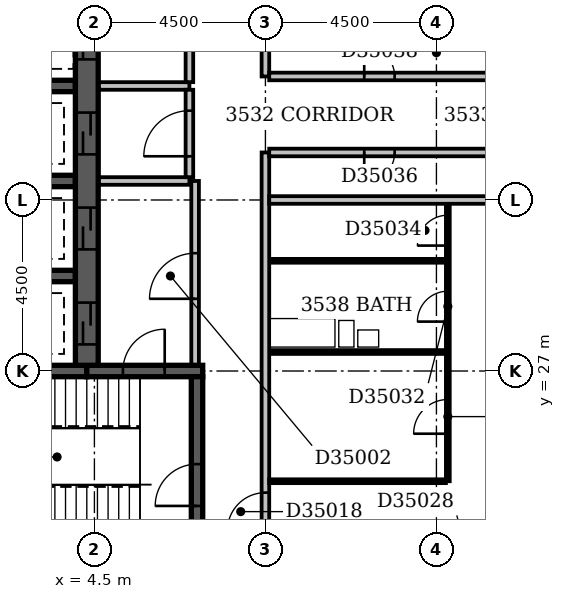
"""IFC4 building model, lengths in metres.
Left out: names, types, materials, properties, quantities, classifications, styles, units other than length and angle.
Written with IfcOpenShell. Run it as: python <this file> out.ifc"""

import sys

from ifc_helpers import new_model, si_unit, direction, frame, frame_2d, origin, place, context, subcontext, project, spatial, rectangle, extrude, element, fill, save


model = new_model("IFC4")
c1 = context("Model", 3, precision=1e-05, world=origin(), true_north=direction((0.0, 1.0)))
c2 = subcontext(c1, "Body", "Model", "MODEL_VIEW")
j1 = project(units=[si_unit("LENGTHUNIT", "METRE"), si_unit("PLANEANGLEUNIT", "RADIAN")], contexts=[c1])
p1 = place(None, origin())
s1 = spatial("IfcSite", under=j1, at=p1, CompositionType="ELEMENT")
p2 = place(p1, origin())
s2 = spatial("IfcBuilding", under=s1, at=p2, CompositionType="ELEMENT")
p3 = place(p2, frame((0.0, 0.0, 141.2)))
s3 = spatial("IfcBuildingStorey", under=s2, at=p3, CompositionType="ELEMENT", Elevation=141.2)
p4 = place(p3, frame((0.35, 27.0, -0.3), z_axis=(0.0, 0.0, 1.0), x_axis=(1.0, 0.0, 0.0)))
e1 = element("IfcWall", 1, at=p4, inside=s3, PredefinedType="SHEAR", context=c2, shape_type="SweptSolid", body=[
    extrude(rectangle(XDim=3.95, YDim=0.3, at=frame_2d((1.975, 0.0))), origin(), (0.0, 0.0, 1.0), 3.6),
])
for number, where, z_axis, x_axis in (
    (2, (0.8, 29.5, -0.3), (0.0, 0.0, 1.0), (1.0, 0.0, 0.0)),
    (3, (0.8, 32.0, -0.3), (0.0, 0.0, 1.0), (1.0, 0.0, 0.0)),
    (4, (0.8, 34.5, -0.3), (0.0, 0.0, 1.0), (1.0, 0.0, 0.0)),
):
    element("IfcWall", number, at=place(p3, frame(where, z_axis=z_axis, x_axis=x_axis)), inside=s3, PredefinedType="SHEAR", context=c2, shape_type="SweptSolid", body=[
        extrude(rectangle(XDim=3.2, YDim=0.3, at=frame_2d((1.6, 0.0))), origin(), (0.0, 0.0, 1.0), 3.6),
    ])
p5 = place(p3, frame((4.3, 27.0, -0.3), z_axis=(0.0, 0.0, 1.0), x_axis=(1.0, 0.0, 0.0)))
e5 = element("IfcWall", 5, at=p5, inside=s3, PredefinedType="SHEAR", context=c2, shape_type="SweptSolid", body=[
    extrude(rectangle(XDim=3.05, YDim=0.3, at=frame_2d((1.525, 0.0))), origin(), (0.0, 0.0, 1.0), 3.6),
])
p6 = place(p5, frame((0.95, 0.0, 0.3)))
e6 = element("IfcOpeningElement", 6, at=p6, cuts=e5, PredefinedType="OPENING", context=c2, shape_type="SweptSolid", body=[
    extrude(rectangle(XDim=1.1, YDim=2.1, at=frame_2d((0.55, 1.05))), frame((0.0, 0.162, 0.0), z_axis=(0.0, -1.0, 0.0), x_axis=(1.0, 0.0, 0.0)), (0.0, 0.0, 1.0), 0.324),
])
p7 = place(p3, frame((4.3, 27.15, -0.3), z_axis=(0.0, 0.0, 1.0), x_axis=(0.0, 1.0, 0.0)))
e7 = element("IfcWall", 7, at=p7, inside=s3, PredefinedType="SHEAR", context=c2, shape_type="SweptSolid", body=[
    extrude(rectangle(XDim=22.05, YDim=0.6, at=frame_2d((11.025, 0.0))), origin(), (0.0, 0.0, 1.0), 3.6),
])
p8 = place(p7, frame((3.05, 0.0, 0.3)))
e8 = element("IfcOpeningElement", 8, at=p8, cuts=e7, PredefinedType="OPENING", context=c2, shape_type="SweptSolid", body=[
    extrude(rectangle(XDim=1.1, YDim=2.1, at=frame_2d((0.55, 1.05))), frame((0.0, 0.312, 0.0), z_axis=(0.0, -1.0, 0.0), x_axis=(1.0, 0.0, 0.0)), (0.0, 0.0, 1.0), 0.624),
])
p9 = place(p7, frame((0.55, 0.0, 0.3)))
e9 = element("IfcOpeningElement", 9, at=p9, cuts=e7, PredefinedType="OPENING", context=c2, shape_type="SweptSolid", body=[
    extrude(rectangle(XDim=1.1, YDim=2.1, at=frame_2d((0.55, 1.05))), frame((0.0, 0.312, 0.0), z_axis=(0.0, -1.0, 0.0), x_axis=(1.0, 0.0, 0.0)), (0.0, 0.0, 1.0), 0.624),
])
p10 = place(p7, frame((20.55, 0.0, 0.3)))
e10 = element("IfcOpeningElement", 10, at=p10, cuts=e7, PredefinedType="OPENING", context=c2, shape_type="SweptSolid", body=[
    extrude(rectangle(XDim=1.1, YDim=2.1, at=frame_2d((0.55, 1.05))), frame((0.0, 0.312, 0.0), z_axis=(0.0, -1.0, 0.0), x_axis=(1.0, 0.0, 0.0)), (0.0, 0.0, 1.0), 0.624),
])
p11 = place(p7, frame((18.05, 0.0, 0.3)))
e11 = element("IfcOpeningElement", 11, at=p11, cuts=e7, PredefinedType="OPENING", context=c2, shape_type="SweptSolid", body=[
    extrude(rectangle(XDim=1.1, YDim=2.1, at=frame_2d((0.55, 1.05))), frame((0.0, 0.312, 0.0), z_axis=(0.0, -1.0, 0.0), x_axis=(1.0, 0.0, 0.0)), (0.0, 0.0, 1.0), 0.624),
])
p12 = place(p7, frame((15.55, 0.0, 0.3)))
e12 = element("IfcOpeningElement", 12, at=p12, cuts=e7, PredefinedType="OPENING", context=c2, shape_type="SweptSolid", body=[
    extrude(rectangle(XDim=1.1, YDim=2.1, at=frame_2d((0.55, 1.05))), frame((0.0, 0.312, 0.0), z_axis=(0.0, -1.0, 0.0), x_axis=(1.0, 0.0, 0.0)), (0.0, 0.0, 1.0), 0.624),
])
p13 = place(p7, frame((13.05, 0.0, 0.3)))
e13 = element("IfcOpeningElement", 13, at=p13, cuts=e7, PredefinedType="OPENING", context=c2, shape_type="SweptSolid", body=[
    extrude(rectangle(XDim=1.1, YDim=2.1, at=frame_2d((0.55, 1.05))), frame((0.0, 0.312, 0.0), z_axis=(0.0, -1.0, 0.0), x_axis=(1.0, 0.0, 0.0)), (0.0, 0.0, 1.0), 0.624),
])
p14 = place(p7, frame((10.55, 0.0, 0.3)))
e14 = element("IfcOpeningElement", 14, at=p14, cuts=e7, PredefinedType="OPENING", context=c2, shape_type="SweptSolid", body=[
    extrude(rectangle(XDim=1.1, YDim=2.1, at=frame_2d((0.55, 1.05))), frame((0.0, 0.312, 0.0), z_axis=(0.0, -1.0, 0.0), x_axis=(1.0, 0.0, 0.0)), (0.0, 0.0, 1.0), 0.624),
])
p15 = place(p7, frame((8.05, 0.0, 0.3)))
e15 = element("IfcOpeningElement", 15, at=p15, cuts=e7, PredefinedType="OPENING", context=c2, shape_type="SweptSolid", body=[
    extrude(rectangle(XDim=1.1, YDim=2.1, at=frame_2d((0.55, 1.05))), frame((0.0, 0.312, 0.0), z_axis=(0.0, -1.0, 0.0), x_axis=(1.0, 0.0, 0.0)), (0.0, 0.0, 1.0), 0.624),
])
p16 = place(p7, frame((5.55, 0.0, 0.3)))
e16 = element("IfcOpeningElement", 16, at=p16, cuts=e7, PredefinedType="OPENING", context=c2, shape_type="SweptSolid", body=[
    extrude(rectangle(XDim=1.1, YDim=2.1, at=frame_2d((0.55, 1.05))), frame((0.0, 0.312, 0.0), z_axis=(0.0, -1.0, 0.0), x_axis=(1.0, 0.0, 0.0)), (0.0, 0.0, 1.0), 0.624),
])
p17 = place(p3, frame((7.2, 22.65, -0.3), z_axis=(0.0, 0.0, 1.0), x_axis=(0.0, 1.0, 0.0)))
e17 = element("IfcWall", 17, at=p17, inside=s3, PredefinedType="SHEAR", context=c2, shape_type="SweptSolid", body=[
    extrude(rectangle(XDim=4.2, YDim=0.3, at=frame_2d((2.1, 0.0))), origin(), (0.0, 0.0, 1.0), 3.6),
])
p18 = place(p17, frame((0.8, 0.0, 0.3)))
e18 = element("IfcOpeningElement", 18, at=p18, cuts=e17, PredefinedType="OPENING", context=c2, shape_type="SweptSolid", body=[
    extrude(rectangle(XDim=1.1, YDim=2.1, at=frame_2d((0.55, 1.05))), frame((0.0, 0.162, 0.0), z_axis=(0.0, -1.0, 0.0), x_axis=(1.0, 0.0, 0.0)), (0.0, 0.0, 1.0), 0.324),
])
p19 = place(p3, frame((4.62, 34.5, 0.0), z_axis=(0.0, 0.0, 1.0), x_axis=(1.0, 0.0, 0.0)))
e19 = element("IfcWall", 19, at=p19, inside=s3, PredefinedType="PARTITIONING", context=c2, shape_type="SweptSolid", body=[
    extrude(rectangle(XDim=2.38, YDim=0.2, at=frame_2d((1.19, 0.0))), origin(), (0.0, 0.0, 1.0), 3.3),
])
p20 = place(p3, frame((7.0, 34.6, 0.0), z_axis=(0.0, 0.0, 1.0), x_axis=(0.0, 1.0, 0.0)))
e20 = element("IfcWall", 20, at=p20, inside=s3, PredefinedType="PARTITIONING", context=c2, shape_type="SweptSolid", body=[
    extrude(rectangle(XDim=14.9, YDim=0.2, at=frame_2d((7.45, 0.0))), origin(), (0.0, 0.0, 1.0), 3.3),
])
p21 = place(p20, frame((2.8, 0.0, 0.0)))
e21 = element("IfcOpeningElement", 21, at=p21, cuts=e20, PredefinedType="OPENING", context=c2, shape_type="SweptSolid", body=[
    extrude(rectangle(XDim=1.2, YDim=2.1, at=frame_2d((0.6, 1.05))), frame((0.0, 0.112, 0.0), z_axis=(0.0, -1.0, 0.0), x_axis=(1.0, 0.0, 0.0)), (0.0, 0.0, 1.0), 0.224),
])
p22 = place(p20, frame((9.8, 0.0, 0.0)))
e22 = element("IfcOpeningElement", 22, at=p22, cuts=e20, PredefinedType="OPENING", context=c2, shape_type="SweptSolid", body=[
    extrude(rectangle(XDim=1.2, YDim=2.1, at=frame_2d((0.6, 1.05))), frame((0.0, 0.112, 0.0), z_axis=(0.0, -1.0, 0.0), x_axis=(1.0, 0.0, 0.0)), (0.0, 0.0, 1.0), 0.224),
])
p23 = place(p3, frame((4.62, 32.0, 0.0), z_axis=(0.0, 0.0, 1.0), x_axis=(1.0, 0.0, 0.0)))
e23 = element("IfcWall", 23, at=p23, inside=s3, PredefinedType="PARTITIONING", context=c2, shape_type="SweptSolid", body=[
    extrude(rectangle(XDim=2.38, YDim=0.2, at=frame_2d((1.19, 0.0))), origin(), (0.0, 0.0, 1.0), 3.3),
])
p24 = place(p3, frame((7.0, 32.1, 0.0), z_axis=(0.0, 0.0, 1.0), x_axis=(0.0, 1.0, 0.0)))
e24 = element("IfcWall", 24, at=p24, inside=s3, PredefinedType="PARTITIONING", context=c2, shape_type="SweptSolid", body=[
    extrude(rectangle(XDim=2.3, YDim=0.2, at=frame_2d((1.15, 0.0))), origin(), (0.0, 0.0, 1.0), 3.3),
])
p25 = place(p24, frame((0.55, 0.0, 0.0)))
e25 = element("IfcOpeningElement", 25, at=p25, cuts=e24, PredefinedType="OPENING", context=c2, shape_type="SweptSolid", body=[
    extrude(rectangle(XDim=1.2, YDim=2.1, at=frame_2d((0.6, 1.05))), frame((0.0, 0.112, 0.0), z_axis=(0.0, -1.0, 0.0), x_axis=(1.0, 0.0, 0.0)), (0.0, 0.0, 1.0), 0.224),
])
p26 = place(p3, frame((7.15, 27.17, 0.0), z_axis=(0.0, 0.0, 1.0), x_axis=(0.0, 1.0, 0.0)))
e26 = element("IfcWall", 26, at=p26, inside=s3, PredefinedType="PARTITIONING", context=c2, shape_type="SweptSolid", body=[
    extrude(rectangle(XDim=4.83, YDim=0.2, at=frame_2d((2.415, 0.0))), origin(), (0.0, 0.0, 1.0), 3.3),
])
p27 = place(p26, frame((1.73, 0.0, 0.0)))
e27 = element("IfcOpeningElement", 27, at=p27, cuts=e26, PredefinedType="OPENING", context=c2, shape_type="SweptSolid", body=[
    extrude(rectangle(XDim=1.2, YDim=2.1, at=frame_2d((0.6, 1.05))), frame((0.0, 0.112, 0.0), z_axis=(0.0, -1.0, 0.0), x_axis=(1.0, 0.0, 0.0)), (0.0, 0.0, 1.0), 0.224),
])
p28 = place(p3, frame((9.0, 5.0, 0.0), z_axis=(0.0, 0.0, 1.0), x_axis=(0.0, 1.0, 0.0)))
e28 = element("IfcWall", 28, at=p28, inside=s3, PredefinedType="PARTITIONING", context=c2, shape_type="SweptSolid", body=[
    extrude(rectangle(XDim=27.75, YDim=0.2, at=frame_2d((13.875, 0.0))), origin(), (0.0, 0.0, 1.0), 3.3),
])
p29 = place(p28, frame((17.8, 0.0, 0.0)))
e29 = element("IfcOpeningElement", 29, at=p29, cuts=e28, PredefinedType="OPENING", context=c2, shape_type="SweptSolid", body=[
    extrude(rectangle(XDim=1.0, YDim=2.1, at=frame_2d((0.5, 1.05))), frame((0.0, 0.112, 0.0), z_axis=(0.0, -1.0, 0.0), x_axis=(1.0, 0.0, 0.0)), (0.0, 0.0, 1.0), 0.224),
])
p30 = place(p28, frame((14.95, 0.0, 0.0)))
e30 = element("IfcOpeningElement", 30, at=p30, cuts=e28, PredefinedType="OPENING", context=c2, shape_type="SweptSolid", body=[
    extrude(rectangle(XDim=1.0, YDim=2.1, at=frame_2d((0.5, 1.05))), frame((0.0, 0.112, 0.0), z_axis=(0.0, -1.0, 0.0), x_axis=(1.0, 0.0, 0.0)), (0.0, 0.0, 1.0), 0.224),
])
p31 = place(p28, frame((11.7, 0.0, 0.0)))
e31 = element("IfcOpeningElement", 31, at=p31, cuts=e28, PredefinedType="OPENING", context=c2, shape_type="SweptSolid", body=[
    extrude(rectangle(XDim=1.0, YDim=2.1, at=frame_2d((0.5, 1.05))), frame((0.0, 0.112, 0.0), z_axis=(0.0, -1.0, 0.0), x_axis=(1.0, 0.0, 0.0)), (0.0, 0.0, 1.0), 0.224),
])
p32 = place(p28, frame((1.5, 0.0, 0.0)))
e32 = element("IfcOpeningElement", 32, at=p32, cuts=e28, PredefinedType="OPENING", context=c2, shape_type="SweptSolid", body=[
    extrude(rectangle(XDim=0.9, YDim=2.1, at=frame_2d((0.45, 1.05))), frame((0.0, 0.112, 0.0), z_axis=(0.0, -1.0, 0.0), x_axis=(1.0, 0.0, 0.0)), (0.0, 0.0, 1.0), 0.224),
])
p33 = place(p3, frame((9.1, 24.1, 0.0), z_axis=(0.0, 0.0, 1.0), x_axis=(1.0, 0.0, 0.0)))
e33 = element("IfcWall", 33, at=p33, inside=s3, PredefinedType="PARTITIONING", context=c2, shape_type="SweptSolid", body=[
    extrude(rectangle(XDim=4.65, YDim=0.1, at=frame_2d((2.325, 0.0))), origin(), (0.0, 0.0, 1.0), 3.3),
])
p34 = place(p3, frame((13.8, 24.1, 0.0), z_axis=(0.0, 0.0, 1.0), x_axis=(0.0, 1.0, 0.0)))
e34 = element("IfcWall", 34, at=p34, inside=s3, PredefinedType="PARTITIONING", context=c2, shape_type="SweptSolid", body=[
    extrude(rectangle(XDim=7.3, YDim=0.1, at=frame_2d((3.65, 0.0))), origin(), (0.0, 0.0, 1.0), 3.3),
])
p35 = place(p34, frame((4.2, 0.0, 0.0)))
e35 = element("IfcOpeningElement", 35, at=p35, cuts=e34, PredefinedType="OPENING", context=c2, shape_type="SweptSolid", body=[
    extrude(rectangle(XDim=0.8, YDim=2.1, at=frame_2d((0.4, 1.05))), frame((0.0, 0.062, 0.0), z_axis=(0.0, -1.0, 0.0), x_axis=(1.0, 0.0, 0.0)), (0.0, 0.0, 1.0), 0.124),
])
p36 = place(p34, frame((1.25, 0.0, 0.0)))
e36 = element("IfcOpeningElement", 36, at=p36, cuts=e34, PredefinedType="OPENING", context=c2, shape_type="SweptSolid", body=[
    extrude(rectangle(XDim=0.9, YDim=2.1, at=frame_2d((0.45, 1.05))), frame((0.0, 0.062, 0.0), z_axis=(0.0, -1.0, 0.0), x_axis=(1.0, 0.0, 0.0)), (0.0, 0.0, 1.0), 0.124),
])
p37 = place(p34, frame((6.2, 0.0, 0.0)))
e37 = element("IfcOpeningElement", 37, at=p37, cuts=e34, PredefinedType="OPENING", context=c2, shape_type="SweptSolid", body=[
    extrude(rectangle(XDim=0.8, YDim=2.1, at=frame_2d((0.4, 1.05))), frame((0.0, 0.062, 0.0), z_axis=(0.0, -1.0, 0.0), x_axis=(1.0, 0.0, 0.0)), (0.0, 0.0, 1.0), 0.124),
])
p38 = place(p3, frame((9.1, 27.5, 0.0), z_axis=(0.0, 0.0, 1.0), x_axis=(1.0, 0.0, 0.0)))
e38 = element("IfcWall", 38, at=p38, inside=s3, PredefinedType="PLUMBINGWALL", context=c2, shape_type="SweptSolid", body=[
    extrude(rectangle(XDim=4.65, YDim=0.1, at=frame_2d((2.325, 0.0))), origin(), (0.0, 0.0, 1.0), 2.7),
])
p39 = place(p3, frame((9.1, 29.9, 0.0), z_axis=(0.0, 0.0, 1.0), x_axis=(1.0, 0.0, 0.0)))
e39 = element("IfcWall", 39, at=p39, inside=s3, PredefinedType="PLUMBINGWALL", context=c2, shape_type="SweptSolid", body=[
    extrude(rectangle(XDim=4.65, YDim=0.1, at=frame_2d((2.325, 0.0))), origin(), (0.0, 0.0, 1.0), 3.3),
])
p40 = place(p3, frame((9.1, 31.5, 0.0), z_axis=(0.0, 0.0, 1.0), x_axis=(1.0, 0.0, 0.0)))
e40 = element("IfcWall", 40, at=p40, inside=s3, PredefinedType="PARTITIONING", context=c2, shape_type="SweptSolid", body=[
    extrude(rectangle(XDim=12.9, YDim=0.2, at=frame_2d((6.45, 0.0))), origin(), (0.0, 0.0, 1.0), 3.3),
])
p41 = place(p3, frame((9.1, 32.75, 0.0), z_axis=(0.0, 0.0, 1.0), x_axis=(1.0, 0.0, 0.0)))
e41 = element("IfcWall", 41, at=p41, inside=s3, PredefinedType="PARTITIONING", context=c2, shape_type="SweptSolid", body=[
    extrude(rectangle(XDim=8.85, YDim=0.2, at=frame_2d((4.425, 0.0))), origin(), (0.0, 0.0, 1.0), 3.3),
])
p42 = place(p41, frame((2.5, 0.0, 0.0)))
e42 = element("IfcOpeningElement", 42, at=p42, cuts=e41, PredefinedType="OPENING", context=c2, shape_type="SweptSolid", body=[
    extrude(rectangle(XDim=0.8, YDim=2.1, at=frame_2d((0.4, 1.05))), frame((0.0, 0.112, 0.0), z_axis=(0.0, -1.0, 0.0), x_axis=(1.0, 0.0, 0.0)), (0.0, 0.0, 1.0), 0.224),
])
p43 = place(p3, frame((9.0, 34.75, 0.0), z_axis=(0.0, 0.0, 1.0), x_axis=(0.0, 1.0, 0.0)))
e43 = element("IfcWall", 43, at=p43, inside=s3, PredefinedType="PARTITIONING", context=c2, shape_type="SweptSolid", body=[
    extrude(rectangle(XDim=14.75, YDim=0.2, at=frame_2d((7.375, 0.0))), origin(), (0.0, 0.0, 1.0), 3.3),
])
p44 = place(p43, frame((5.25, 0.0, 0.0)))
e44 = element("IfcOpeningElement", 44, at=p44, cuts=e43, PredefinedType="OPENING", context=c2, shape_type="SweptSolid", body=[
    extrude(rectangle(XDim=0.9, YDim=2.1, at=frame_2d((0.45, 1.05))), frame((0.0, 0.112, 0.0), z_axis=(0.0, -1.0, 0.0), x_axis=(1.0, 0.0, 0.0)), (0.0, 0.0, 1.0), 0.224),
])
p45 = place(p3, frame((9.1, 34.75, 0.0), z_axis=(0.0, 0.0, 1.0), x_axis=(1.0, 0.0, 0.0)))
e45 = element("IfcWall", 45, at=p45, inside=s3, PredefinedType="PARTITIONING", context=c2, shape_type="SweptSolid", body=[
    extrude(rectangle(XDim=8.85, YDim=0.2, at=frame_2d((4.425, 0.0))), origin(), (0.0, 0.0, 1.0), 3.3),
])
p46 = place(p45, frame((2.5, 0.0, 0.0)))
e46 = element("IfcOpeningElement", 46, at=p46, cuts=e45, PredefinedType="OPENING", context=c2, shape_type="SweptSolid", body=[
    extrude(rectangle(XDim=0.8, YDim=2.1, at=frame_2d((0.4, 1.05))), frame((0.0, 0.112, 0.0), z_axis=(0.0, -1.0, 0.0), x_axis=(1.0, 0.0, 0.0)), (0.0, 0.0, 1.0), 0.224),
])
p47 = place(p27, origin())
e47 = element("IfcDoor", 47, at=p47, inside=s3, OperationType="SINGLE_SWING_LEFT", PredefinedType="DOOR", context=c2, shape_type="SweptSolid", body=[
    extrude(rectangle(XDim=1.2, YDim=2.1, at=frame_2d((0.6, 1.05))), frame((0.0, 0.025, 0.0), z_axis=(0.0, -1.0, 0.0), x_axis=(1.0, 0.0, 0.0)), (0.0, 0.0, 1.0), 0.05),
])
fill(e27, e47)
p48 = place(p8, origin())
e48 = element("IfcDoor", 48, at=p48, inside=s3, OperationType="SLIDING_TO_LEFT", PredefinedType="DOOR", context=c2, shape_type="SweptSolid", body=[
    extrude(rectangle(XDim=1.1, YDim=2.1, at=frame_2d((0.55, 1.05))), frame((0.0, 0.025, 0.0), z_axis=(0.0, -1.0, 0.0), x_axis=(1.0, 0.0, 0.0)), (0.0, 0.0, 1.0), 0.05),
])
fill(e8, e48)
p49 = place(p9, origin())
e49 = element("IfcDoor", 49, at=p49, inside=s3, OperationType="SLIDING_TO_LEFT", PredefinedType="DOOR", context=c2, shape_type="SweptSolid", body=[
    extrude(rectangle(XDim=1.1, YDim=2.1, at=frame_2d((0.55, 1.05))), frame((0.0, 0.025, 0.0), z_axis=(0.0, -1.0, 0.0), x_axis=(1.0, 0.0, 0.0)), (0.0, 0.0, 1.0), 0.05),
])
fill(e9, e49)
p50 = place(p15, origin())
e50 = element("IfcDoor", 50, at=p50, inside=s3, OperationType="SLIDING_TO_LEFT", PredefinedType="DOOR", context=c2, shape_type="SweptSolid", body=[
    extrude(rectangle(XDim=1.1, YDim=2.1, at=frame_2d((0.55, 1.05))), frame((0.0, 0.025, 0.0), z_axis=(0.0, -1.0, 0.0), x_axis=(1.0, 0.0, 0.0)), (0.0, 0.0, 1.0), 0.05),
])
fill(e15, e50)
p51 = place(p25, origin())
e51 = element("IfcDoor", 51, at=p51, inside=s3, OperationType="SINGLE_SWING_LEFT", PredefinedType="DOOR", context=c2, shape_type="SweptSolid", body=[
    extrude(rectangle(XDim=1.2, YDim=2.1, at=frame_2d((0.6, 1.05))), frame((0.0, 0.025, 0.0), z_axis=(0.0, -1.0, 0.0), x_axis=(1.0, 0.0, 0.0)), (0.0, 0.0, 1.0), 0.05),
])
fill(e25, e51)
p52 = place(p16, origin())
e52 = element("IfcDoor", 52, at=p52, inside=s3, OperationType="SLIDING_TO_LEFT", PredefinedType="DOOR", context=c2, shape_type="SweptSolid", body=[
    extrude(rectangle(XDim=1.1, YDim=2.1, at=frame_2d((0.55, 1.05))), frame((0.0, 0.025, 0.0), z_axis=(0.0, -1.0, 0.0), x_axis=(1.0, 0.0, 0.0)), (0.0, 0.0, 1.0), 0.05),
])
fill(e16, e52)
p53 = place(p6, frame((1.1, 0.0, 0.0), z_axis=(0.0, 0.0, 1.0), x_axis=(-1.0, 0.0, 0.0)))
e53 = element("IfcDoor", 53, at=p53, inside=s3, OperationType="SINGLE_SWING_LEFT", PredefinedType="DOOR", context=c2, shape_type="SweptSolid", body=[
    extrude(rectangle(XDim=1.1, YDim=2.1, at=frame_2d((0.55, 1.05))), frame((0.0, 0.025, 0.0), z_axis=(0.0, -1.0, 0.0), x_axis=(1.0, 0.0, 0.0)), (0.0, 0.0, 1.0), 0.05),
])
fill(e6, e53)
p54 = place(p18, origin())
e54 = element("IfcDoor", 54, at=p54, inside=s3, OperationType="SINGLE_SWING_LEFT", PredefinedType="DOOR", context=c2, shape_type="SweptSolid", body=[
    extrude(rectangle(XDim=1.1, YDim=2.1, at=frame_2d((0.55, 1.05))), frame((0.0, 0.025, 0.0), z_axis=(0.0, -1.0, 0.0), x_axis=(1.0, 0.0, 0.0)), (0.0, 0.0, 1.0), 0.05),
])
fill(e18, e54)
p55 = place(p29, origin())
e55 = element("IfcDoor", 55, at=p55, inside=s3, OperationType="SINGLE_SWING_LEFT", PredefinedType="DOOR", context=c2, shape_type="SweptSolid", body=[
    extrude(rectangle(XDim=1.0, YDim=2.1, at=frame_2d((0.5, 1.05))), frame((0.0, 0.025, 0.0), z_axis=(0.0, -1.0, 0.0), x_axis=(1.0, 0.0, 0.0)), (0.0, 0.0, 1.0), 0.05),
])
fill(e29, e55)
p56 = place(p35, origin())
e56 = element("IfcDoor", 56, at=p56, inside=s3, OperationType="SINGLE_SWING_LEFT", PredefinedType="DOOR", context=c2, shape_type="SweptSolid", body=[
    extrude(rectangle(XDim=0.8, YDim=2.1, at=frame_2d((0.4, 1.05))), frame((0.0, 0.025, 0.0), z_axis=(0.0, -1.0, 0.0), x_axis=(1.0, 0.0, 0.0)), (0.0, 0.0, 1.0), 0.05),
])
fill(e35, e56)
p57 = place(p36, origin())
e57 = element("IfcDoor", 57, at=p57, inside=s3, OperationType="SINGLE_SWING_LEFT", PredefinedType="DOOR", context=c2, shape_type="SweptSolid", body=[
    extrude(rectangle(XDim=0.9, YDim=2.1, at=frame_2d((0.45, 1.05))), frame((0.0, 0.025, 0.0), z_axis=(0.0, -1.0, 0.0), x_axis=(1.0, 0.0, 0.0)), (0.0, 0.0, 1.0), 0.05),
])
fill(e36, e57)
p58 = place(p37, origin())
e58 = element("IfcDoor", 58, at=p58, inside=s3, OperationType="SINGLE_SWING_LEFT", PredefinedType="DOOR", context=c2, shape_type="SweptSolid", body=[
    extrude(rectangle(XDim=0.8, YDim=2.1, at=frame_2d((0.4, 1.05))), frame((0.0, 0.025, 0.0), z_axis=(0.0, -1.0, 0.0), x_axis=(1.0, 0.0, 0.0)), (0.0, 0.0, 1.0), 0.05),
])
fill(e37, e58)
p59 = place(p42, frame((0.8, 0.0, 0.0), z_axis=(0.0, 0.0, 1.0), x_axis=(-1.0, 0.0, 0.0)))
e59 = element("IfcDoor", 59, at=p59, inside=s3, OperationType="SINGLE_SWING_RIGHT", PredefinedType="DOOR", context=c2, shape_type="SweptSolid", body=[
    extrude(rectangle(XDim=0.8, YDim=2.1, at=frame_2d((0.4, 1.05))), frame((0.0, 0.025, 0.0), z_axis=(0.0, -1.0, 0.0), x_axis=(1.0, 0.0, 0.0)), (0.0, 0.0, 1.0), 0.05),
])
fill(e42, e59)
p60 = place(p46, origin())
e60 = element("IfcDoor", 60, at=p60, inside=s3, OperationType="SINGLE_SWING_LEFT", PredefinedType="DOOR", context=c2, shape_type="SweptSolid", body=[
    extrude(rectangle(XDim=0.8, YDim=2.1, at=frame_2d((0.4, 1.05))), frame((0.0, 0.025, 0.0), z_axis=(0.0, -1.0, 0.0), x_axis=(1.0, 0.0, 0.0)), (0.0, 0.0, 1.0), 0.05),
])
fill(e46, e60)
save(model, sys.argv[1])
